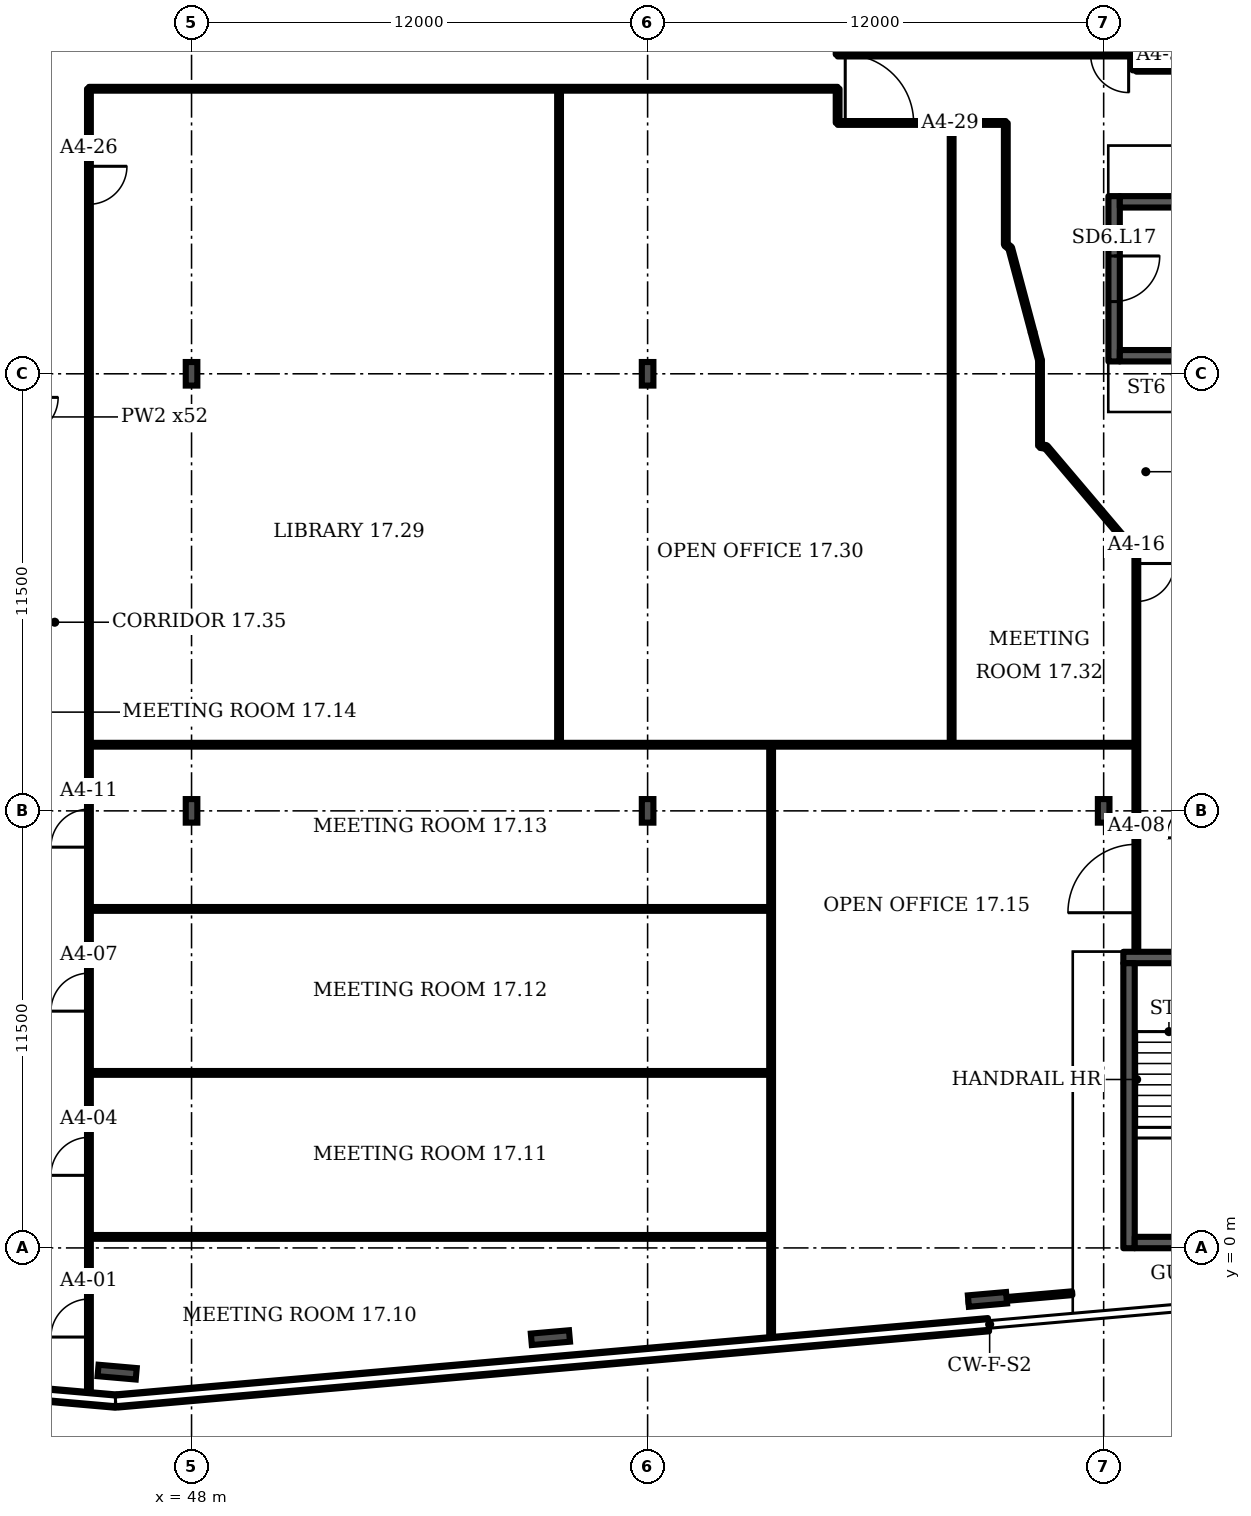
"""IFC4 building model, lengths in metres.
Left out: names, types, materials, properties, quantities, classifications, styles, units other than length and angle.
Written with IfcOpenShell. Run it as: python <this file> out.ifc"""

import sys

from ifc_helpers import new_model, si_unit, direction, frame, frame_2d, origin, origin_2d, place, context, subcontext, project, spatial, rectangle, i_section, extrude, element, fill, save


model = new_model("IFC4")
c1 = context("Model", 3, precision=1e-05, world=origin(), true_north=direction((0.0, 1.0)))
c2 = subcontext(c1, "Body", "Model", "MODEL_VIEW")
j1 = project(units=[si_unit("LENGTHUNIT", "METRE"), si_unit("PLANEANGLEUNIT", "RADIAN")], contexts=[c1])
p1 = place(None, origin())
s1 = spatial("IfcSite", under=j1, at=p1, CompositionType="ELEMENT")
p2 = place(p1, origin())
s2 = spatial("IfcBuilding", under=s1, at=p2, CompositionType="ELEMENT")
p3 = place(p2, frame((0.0, 0.0, 81.1)))
s3 = spatial("IfcBuildingStorey", under=s2, at=p3, CompositionType="ELEMENT", Elevation=81.1)
for number, where, z_axis, x_axis in (
    (1, (46.042, -3.268, 0.0), (0.0, 0.0, 1.0), (-0.087, -0.996, 0.0)),
    (2, (57.442, -2.361, 0.0), (0.0, 0.0, 1.0), (0.087, -0.996, 0.0)),
    (3, (68.942, -1.355, 0.0), (0.0, 0.0, 1.0), (0.087, -0.996, 0.0)),
):
    element("IfcColumn", number, at=place(p3, frame(where, z_axis=z_axis, x_axis=x_axis)), inside=s3, PredefinedType="COLUMN", context=c2, shape_type="SweptSolid", body=[
        extrude(i_section(OverallWidth=0.302, OverallDepth=1.008, WebThickness=0.021, FlangeThickness=0.04, FilletRadius=0.03, at=origin_2d()), origin(), (0.0, 0.0, 1.0), 3.6),
    ])
for number, where, z_axis, x_axis in (
    (4, (48.0, 11.5, 0.0), (0.0, 0.0, 1.0), (1.0, 0.0, 0.0)),
    (5, (60.0, 11.5, 0.0), (0.0, 0.0, 1.0), (1.0, 0.0, 0.0)),
    (6, (72.0, 11.5, 0.0), (0.0, 0.0, 1.0), (1.0, 0.0, 0.0)),
    (7, (48.0, 23.0, 0.0), (0.0, 0.0, 1.0), (1.0, 0.0, 0.0)),
    (8, (60.0, 23.0, 0.0), (0.0, 0.0, 1.0), (1.0, 0.0, 0.0)),
):
    element("IfcColumn", number, at=place(p3, frame(where, z_axis=z_axis, x_axis=x_axis)), inside=s3, PredefinedType="COLUMN", context=c2, shape_type="SweptSolid", body=[
        extrude(i_section(OverallWidth=0.305, OverallDepth=0.62, WebThickness=0.021, FlangeThickness=0.04, FilletRadius=0.027, at=origin_2d()), origin(), (0.0, 0.0, 1.0), 3.6),
    ])
p4 = place(p3, frame((34.601, -3.032, 0.0), z_axis=(0.0, 0.0, 1.0), x_axis=(0.996193, -0.087148, 0.0)))
e9 = element("IfcWall", 9, at=p4, inside=s3, PredefinedType="SOLIDWALL", context=c2, shape_type="SweptSolid", body=[
    extrude(rectangle(XDim=11.458, YDim=0.35, at=frame_2d((5.729, 0.0))), origin(), (0.0, 0.0, 1.0), 1.0),
])
p5 = place(p3, frame((46.045, -4.026, 0.0), z_axis=(0.0, 0.0, 1.0), x_axis=(0.99619, 0.087163, 0.0)))
e10 = element("IfcWall", 10, at=p5, inside=s3, PredefinedType="SOLIDWALL", context=c2, shape_type="SweptSolid", body=[
    extrude(rectangle(XDim=23.013, YDim=0.35, at=frame_2d((11.506, 0.0))), origin(), (0.0, 0.0, 1.0), 1.0),
])
p6 = place(p3, frame((72.518, 7.642, 0.0), z_axis=(0.0, 0.0, 1.0), x_axis=(1.0, 0.0, 0.0)))
e11 = element("IfcWall", 11, at=p6, inside=s3, PredefinedType="SHEAR", context=c2, shape_type="SweptSolid", body=[
    extrude(rectangle(XDim=4.35, YDim=0.3, at=frame_2d((2.175, 0.0))), origin(), (0.0, 0.0, 1.0), 3.2),
])
p7 = place(p6, frame((1.575, 0.0, 0.0)))
e12 = element("IfcOpeningElement", 12, at=p7, cuts=e11, PredefinedType="OPENING", context=c2, shape_type="SweptSolid", body=[
    extrude(rectangle(XDim=1.2, YDim=2.1, at=frame_2d((0.6, 1.05))), frame((0.0, 0.16, 0.0), z_axis=(0.0, -1.0, 0.0), x_axis=(1.0, 0.0, 0.0)), (0.0, 0.0, 1.0), 0.32),
])
p8 = place(p3, frame((72.275, 23.325, 0.0), z_axis=(0.0, 0.0, 1.0), x_axis=(0.0, 1.0, 0.0)))
e13 = element("IfcWall", 13, at=p8, inside=s3, PredefinedType="SHEAR", context=c2, shape_type="SweptSolid", body=[
    extrude(rectangle(XDim=4.35, YDim=0.3, at=frame_2d((2.175, 0.0))), origin(), (0.0, 0.0, 1.0), 3.2),
])
p9 = place(p8, frame((1.575, 0.0, 0.0)))
e14 = element("IfcOpeningElement", 14, at=p9, cuts=e13, PredefinedType="OPENING", context=c2, shape_type="SweptSolid", body=[
    extrude(rectangle(XDim=1.2, YDim=2.1, at=frame_2d((0.6, 1.05))), frame((0.0, 0.16, 0.0), z_axis=(0.0, -1.0, 0.0), x_axis=(1.0, 0.0, 0.0)), (0.0, 0.0, 1.0), 0.32),
])
p10 = place(p3, frame((45.3, -3.943, 0.0), z_axis=(0.0, 0.0, 1.0), x_axis=(0.0, 1.0, 0.0)))
e15 = element("IfcWall", 15, at=p10, inside=s3, PredefinedType="PARTITIONING", context=c2, shape_type="SweptSolid", body=[
    extrude(rectangle(XDim=34.443, YDim=0.1, at=frame_2d((17.222, 0.0))), origin(), (0.0, 0.0, 1.0), 2.58),
])
p11 = place(p10, frame((1.598, 0.0, 0.0)))
e16 = element("IfcOpeningElement", 16, at=p11, cuts=e15, PredefinedType="OPENING", context=c2, shape_type="SweptSolid", body=[
    extrude(rectangle(XDim=1.0, YDim=2.1, at=frame_2d((0.5, 1.05))), frame((0.0, 0.06, 0.0), z_axis=(0.0, -1.0, 0.0), x_axis=(1.0, 0.0, 0.0)), (0.0, 0.0, 1.0), 0.12),
])
p12 = place(p10, frame((5.853, 0.0, 0.0)))
e17 = element("IfcOpeningElement", 17, at=p12, cuts=e15, PredefinedType="OPENING", context=c2, shape_type="SweptSolid", body=[
    extrude(rectangle(XDim=1.0, YDim=2.1, at=frame_2d((0.5, 1.05))), frame((0.0, 0.06, 0.0), z_axis=(0.0, -1.0, 0.0), x_axis=(1.0, 0.0, 0.0)), (0.0, 0.0, 1.0), 0.12),
])
p13 = place(p10, frame((10.173, 0.0, 0.0)))
e18 = element("IfcOpeningElement", 18, at=p13, cuts=e15, PredefinedType="OPENING", context=c2, shape_type="SweptSolid", body=[
    extrude(rectangle(XDim=1.0, YDim=2.1, at=frame_2d((0.5, 1.05))), frame((0.0, 0.06, 0.0), z_axis=(0.0, -1.0, 0.0), x_axis=(1.0, 0.0, 0.0)), (0.0, 0.0, 1.0), 0.12),
])
p14 = place(p10, frame((14.488, 0.0, 0.0)))
e19 = element("IfcOpeningElement", 19, at=p14, cuts=e15, PredefinedType="OPENING", context=c2, shape_type="SweptSolid", body=[
    extrude(rectangle(XDim=1.0, YDim=2.1, at=frame_2d((0.5, 1.05))), frame((0.0, 0.06, 0.0), z_axis=(0.0, -1.0, 0.0), x_axis=(1.0, 0.0, 0.0)), (0.0, 0.0, 1.0), 0.12),
])
p15 = place(p10, frame((31.403, 0.0, 0.0)))
e20 = element("IfcOpeningElement", 20, at=p15, cuts=e15, PredefinedType="OPENING", context=c2, shape_type="SweptSolid", body=[
    extrude(rectangle(XDim=1.0, YDim=2.1, at=frame_2d((0.5, 1.05))), frame((0.0, 0.06, 0.0), z_axis=(0.0, -1.0, 0.0), x_axis=(1.0, 0.0, 0.0)), (0.0, 0.0, 1.0), 0.12),
])
for number, where, z_axis, x_axis in (
    (21, (45.3, 0.29, 0.0), (0.0, 0.0, 1.0), (1.0, 0.0, 0.0)),
    (22, (45.3, 4.605, 0.0), (0.0, 0.0, 1.0), (1.0, 0.0, 0.0)),
    (23, (45.3, 8.92, 0.0), (0.0, 0.0, 1.0), (1.0, 0.0, 0.0)),
):
    element("IfcWall", number, at=place(p3, frame(where, z_axis=z_axis, x_axis=x_axis)), inside=s3, PredefinedType="PARTITIONING", context=c2, shape_type="SweptSolid", body=[
        extrude(rectangle(XDim=17.95, YDim=0.1, at=frame_2d((8.975, 0.0))), origin(), (0.0, 0.0, 1.0), 3.2),
    ])
p16 = place(p3, frame((45.3, 13.24, 0.0), z_axis=(0.0, 0.0, 1.0), x_axis=(1.0, 0.0, 0.0)))
e24 = element("IfcWall", 24, at=p16, inside=s3, PredefinedType="PARTITIONING", context=c2, shape_type="SweptSolid", body=[
    extrude(rectangle(XDim=27.56, YDim=0.1, at=frame_2d((13.78, 0.0))), origin(), (0.0, 0.0, 1.0), 3.2),
])
p17 = place(p3, frame((45.3, 30.5, 0.0), z_axis=(0.0, 0.0, 1.0), x_axis=(1.0, 0.0, 0.0)))
e25 = element("IfcWall", 25, at=p17, inside=s3, PredefinedType="PARTITIONING", context=c2, shape_type="SweptSolid", body=[
    extrude(rectangle(XDim=19.7, YDim=0.1, at=frame_2d((9.85, 0.0))), origin(), (0.0, 0.0, 1.0), 3.2),
])
p18 = place(p3, frame((57.67, 13.24, 0.0), z_axis=(0.0, 0.0, 1.0), x_axis=(0.0, 1.0, 0.0)))
e26 = element("IfcWall", 26, at=p18, inside=s3, PredefinedType="PARTITIONING", context=c2, shape_type="SweptSolid", body=[
    extrude(rectangle(XDim=17.26, YDim=0.1, at=frame_2d((8.63, 0.0))), origin(), (0.0, 0.0, 1.0), 3.2),
])
p19 = place(p3, frame((63.25, -2.495, 0.0), z_axis=(0.0, 0.0, 1.0), x_axis=(0.0, 1.0, 0.0)))
e27 = element("IfcWall", 27, at=p19, inside=s3, PredefinedType="PARTITIONING", context=c2, shape_type="SweptSolid", body=[
    extrude(rectangle(XDim=15.735, YDim=0.1, at=frame_2d((7.868, 0.0))), origin(), (0.0, 0.0, 1.0), 2.58),
])
p20 = place(p3, frame((65.0, 29.6, 0.0), z_axis=(0.0, 0.0, 1.0), x_axis=(0.0, 1.0, 0.0)))
e28 = element("IfcWall", 28, at=p20, inside=s3, PredefinedType="PARTITIONING", context=c2, shape_type="SweptSolid", body=[
    extrude(rectangle(XDim=0.9, YDim=0.1, at=frame_2d((0.45, 0.0))), origin(), (0.0, 0.0, 1.0), 3.2),
])
p21 = place(p3, frame((65.0, 29.6, 0.0), z_axis=(0.0, 0.0, 1.0), x_axis=(1.0, 0.0, 0.0)))
e29 = element("IfcWall", 29, at=p21, inside=s3, PredefinedType="PARTITIONING", context=c2, shape_type="SweptSolid", body=[
    extrude(rectangle(XDim=4.425, YDim=0.1, at=frame_2d((2.212, 0.0))), origin(), (0.0, 0.0, 1.0), 3.2),
])
p22 = place(p21, frame((0.2, 0.0, 0.0)))
e30 = element("IfcOpeningElement", 30, at=p22, cuts=e29, PredefinedType="OPENING", context=c2, shape_type="SweptSolid", body=[
    extrude(rectangle(XDim=1.8, YDim=2.1, at=frame_2d((0.9, 1.05))), frame((0.0, 0.06, 0.0), z_axis=(0.0, -1.0, 0.0), x_axis=(1.0, 0.0, 0.0)), (0.0, 0.0, 1.0), 0.12),
])
p23 = place(p3, frame((65.0, 31.4, 0.0), z_axis=(0.0, 0.0, 1.0), x_axis=(0.0, 1.0, 0.0)))
e31 = element("IfcWall", 31, at=p23, inside=s3, PredefinedType="PARTITIONING", context=c2, shape_type="SweptSolid", body=[
    extrude(rectangle(XDim=2.58, YDim=0.1, at=frame_2d((1.29, 0.0))), origin(), (0.0, 0.0, 1.0), 3.2),
])
p24 = place(p23, frame((0.9, 0.0, 0.0)))
e32 = element("IfcOpeningElement", 32, at=p24, cuts=e31, PredefinedType="OPENING", context=c2, shape_type="SweptSolid", body=[
    extrude(rectangle(XDim=1.0, YDim=2.1, at=frame_2d((0.5, 1.05))), frame((0.0, 0.06, 0.0), z_axis=(0.0, -1.0, 0.0), x_axis=(1.0, 0.0, 0.0)), (0.0, 0.0, 1.0), 0.12),
])
p25 = place(p3, frame((65.0, 31.4, 0.0), z_axis=(0.0, 0.0, 1.0), x_axis=(1.0, 0.0, 0.0)))
e33 = element("IfcWall", 33, at=p25, inside=s3, PredefinedType="PARTITIONING", context=c2, shape_type="SweptSolid", body=[
    extrude(rectangle(XDim=7.81, YDim=0.1, at=frame_2d((3.905, 0.0))), origin(), (0.0, 0.0, 1.0), 3.2),
])
p26 = place(p25, frame((6.657, 0.0, 0.0)))
e34 = element("IfcOpeningElement", 34, at=p26, cuts=e33, PredefinedType="OPENING", context=c2, shape_type="SweptSolid", body=[
    extrude(rectangle(XDim=1.0, YDim=2.1, at=frame_2d((0.5, 1.05))), frame((0.0, 0.06, 0.0), z_axis=(0.0, -1.0, 0.0), x_axis=(1.0, 0.0, 0.0)), (0.0, 0.0, 1.0), 0.12),
])
p27 = place(p3, frame((68.0, 13.24, 0.0), z_axis=(0.0, 0.0, 1.0), x_axis=(0.0, 1.0, 0.0)))
e35 = element("IfcWall", 35, at=p27, inside=s3, PredefinedType="PARTITIONING", context=c2, shape_type="SweptSolid", body=[
    extrude(rectangle(XDim=16.36, YDim=0.1, at=frame_2d((8.18, 0.0))), origin(), (0.0, 0.0, 1.0), 3.2),
])
p28 = place(p3, frame((68.0, 31.4, 0.0), z_axis=(0.0, 0.0, 1.0), x_axis=(0.0, 1.0, 0.0)))
e36 = element("IfcWall", 36, at=p28, inside=s3, PredefinedType="PARTITIONING", context=c2, shape_type="SweptSolid", body=[
    extrude(rectangle(XDim=8.39, YDim=0.1, at=frame_2d((4.195, 0.0))), origin(), (0.0, 0.0, 1.0), 3.2),
])
p29 = place(p3, frame((68.445, -1.43, 0.0), z_axis=(0.0, 0.0, 1.0), x_axis=(0.996195, 0.087118, 0.0)))
e37 = element("IfcWall", 37, at=p29, inside=s3, PredefinedType="PARTITIONING", context=c2, shape_type="SweptSolid", body=[
    extrude(rectangle(XDim=2.738, YDim=0.1, at=frame_2d((1.369, 0.0))), origin(), (0.0, 0.0, 1.0), 2.58),
])
p30 = place(p3, frame((69.425, 26.4, 0.0), z_axis=(0.0, 0.0, 1.0), x_axis=(0.0, 1.0, 0.0)))
e38 = element("IfcWall", 38, at=p30, inside=s3, PredefinedType="PARTITIONING", context=c2, shape_type="SweptSolid", body=[
    extrude(rectangle(XDim=3.2, YDim=0.1, at=frame_2d((1.6, 0.0))), origin(), (0.0, 0.0, 1.0), 3.2),
])
p31 = place(p3, frame((69.54, 26.31, 0.0), z_axis=(0.0, 0.0, 1.0), x_axis=(-0.787997, 0.615675, 0.0)))
e39 = element("IfcWall", 39, at=p31, inside=s3, PredefinedType="PARTITIONING", context=c2, shape_type="SweptSolid", body=[
    extrude(rectangle(XDim=0.146, YDim=0.1, at=frame_2d((0.073, 0.0))), origin(), (0.0, 0.0, 1.0), 3.2),
])
p32 = place(p3, frame((70.13, 24.095, 0.0), z_axis=(0.0, 0.0, 1.0), x_axis=(-0.257318, 0.966327, 0.0)))
e40 = element("IfcWall", 40, at=p32, inside=s3, PredefinedType="PARTITIONING", context=c2, shape_type="SweptSolid", body=[
    extrude(rectangle(XDim=2.292, YDim=0.1, at=frame_2d((1.146, 0.0))), origin(), (0.0, 0.0, 1.0), 3.2),
])
p33 = place(p3, frame((70.325, 21.1, 0.0), z_axis=(0.0, 0.0, 1.0), x_axis=(0.0, 1.0, 0.0)))
e41 = element("IfcWall", 41, at=p33, inside=s3, PredefinedType="PARTITIONING", context=c2, shape_type="SweptSolid", body=[
    extrude(rectangle(XDim=2.255, YDim=0.1, at=frame_2d((1.127, 0.0))), origin(), (0.0, 0.0, 1.0), 3.2),
])
p34 = place(p3, frame((70.325, 23.355, 0.0), z_axis=(0.0, 0.0, 1.0), x_axis=(-0.254901, 0.966965, 0.0)))
e42 = element("IfcWall", 42, at=p34, inside=s3, PredefinedType="PARTITIONING", context=c2, shape_type="SweptSolid", body=[
    extrude(rectangle(XDim=0.765, YDim=0.1, at=frame_2d((0.383, 0.0))), origin(), (0.0, 0.0, 1.0), 3.2),
])
p35 = place(p3, frame((70.485, 21.075, 0.0), z_axis=(0.0, 0.0, 1.0), x_axis=(-0.987098, 0.160112, 0.0)))
e43 = element("IfcWall", 43, at=p35, inside=s3, PredefinedType="PARTITIONING", context=c2, shape_type="SweptSolid", body=[
    extrude(rectangle(XDim=0.157, YDim=0.1, at=frame_2d((0.079, 0.0))), origin(), (0.0, 0.0, 1.0), 3.2),
])
p36 = place(p3, frame((72.81, 30.985, 0.0), z_axis=(0.0, 0.0, 1.0), x_axis=(0.0, 1.0, 0.0)))
e44 = element("IfcWall", 44, at=p36, inside=s3, PredefinedType="PARTITIONING", context=c2, shape_type="SweptSolid", body=[
    extrude(rectangle(XDim=0.415, YDim=0.1, at=frame_2d((0.208, 0.0))), origin(), (0.0, 0.0, 1.0), 3.2),
])
p37 = place(p3, frame((72.86, 7.812, 0.0), z_axis=(0.0, 0.0, 1.0), x_axis=(0.0, 1.0, 0.0)))
e45 = element("IfcWall", 45, at=p37, inside=s3, PredefinedType="PARTITIONING", context=c2, shape_type="SweptSolid", body=[
    extrude(rectangle(XDim=10.463, YDim=0.1, at=frame_2d((5.231, 0.0))), origin(), (0.0, 0.0, 1.0), 3.2),
])
p38 = place(p37, frame((1.008, 0.0, 0.0)))
e46 = element("IfcOpeningElement", 46, at=p38, cuts=e45, PredefinedType="OPENING", context=c2, shape_type="SweptSolid", body=[
    extrude(rectangle(XDim=1.8, YDim=2.1, at=frame_2d((0.9, 1.05))), frame((0.0, 0.06, 0.0), z_axis=(0.0, -1.0, 0.0), x_axis=(1.0, 0.0, 0.0)), (0.0, 0.0, 1.0), 0.12),
])
p39 = place(p37, frame((9.197, 0.0, 0.0)))
e47 = element("IfcOpeningElement", 47, at=p39, cuts=e45, PredefinedType="OPENING", context=c2, shape_type="SweptSolid", body=[
    extrude(rectangle(XDim=1.0, YDim=2.1, at=frame_2d((0.5, 1.05))), frame((0.0, 0.06, 0.0), z_axis=(0.0, -1.0, 0.0), x_axis=(1.0, 0.0, 0.0)), (0.0, 0.0, 1.0), 0.12),
])
p40 = place(p3, frame((72.86, 31.0, 0.0), z_axis=(0.0, 0.0, 1.0), x_axis=(1.0, 0.0, 0.0)))
e48 = element("IfcWall", 48, at=p40, inside=s3, PredefinedType="PARTITIONING", context=c2, shape_type="SweptSolid", body=[
    extrude(rectangle(XDim=1.8, YDim=0.1, at=frame_2d((0.9, 0.0))), origin(), (0.0, 0.0, 1.0), 3.2),
])
p41 = place(p3, frame((72.86, 18.275, 0.0), z_axis=(0.0, 0.0, 1.0), x_axis=(-0.646848, 0.762613, 0.0)))
e49 = element("IfcWall", 49, at=p41, inside=s3, PredefinedType="PARTITIONING", context=c2, shape_type="SweptSolid", body=[
    extrude(rectangle(XDim=3.672, YDim=0.1, at=frame_2d((1.836, 0.0))), origin(), (0.0, 0.0, 1.0), 3.2),
])
p42 = place(p3, frame((72.667, -0.008, 0.0), z_axis=(0.0, 0.0, 1.0), x_axis=(0.0, 1.0, 0.0)))
e50 = element("IfcWall", 50, at=p42, inside=s3, PredefinedType="SHEAR", context=c2, shape_type="SweptSolid", body=[
    extrude(rectangle(XDim=7.5, YDim=0.3, at=frame_2d((3.75, 0.0))), origin(), (0.0, 0.0, 1.0), 3.2),
])
p43 = place(p3, frame((72.817, 0.142, 0.0), z_axis=(0.0, 0.0, 1.0), x_axis=(1.0, 0.0, 0.0)))
e51 = element("IfcWall", 51, at=p43, inside=s3, PredefinedType="SHEAR", context=c2, shape_type="SweptSolid", body=[
    extrude(rectangle(XDim=3.75, YDim=0.3, at=frame_2d((1.875, 0.0))), origin(), (0.0, 0.0, 1.0), 3.2),
])
for number, where, z_axis, x_axis in (
    (52, (72.425, 23.475, 0.0), (0.0, 0.0, 1.0), (1.0, 0.0, 0.0)),
    (53, (72.425, 27.525, 0.0), (0.0, 0.0, 1.0), (1.0, 0.0, 0.0)),
):
    element("IfcWall", number, at=place(p3, frame(where, z_axis=z_axis, x_axis=x_axis)), inside=s3, PredefinedType="SHEAR", context=c2, shape_type="SweptSolid", body=[
        extrude(rectangle(XDim=7.5, YDim=0.3, at=frame_2d((3.75, 0.0))), origin(), (0.0, 0.0, 1.0), 3.2),
    ])
p44 = place(p9, origin())
e54 = element("IfcDoor", 54, at=p44, inside=s3, OperationType="SINGLE_SWING_RIGHT", PredefinedType="DOOR", context=c2, shape_type="SweptSolid", body=[
    extrude(rectangle(XDim=1.2, YDim=2.1, at=frame_2d((0.6, 1.05))), frame((0.0, 0.025, 0.0), z_axis=(0.0, -1.0, 0.0), x_axis=(1.0, 0.0, 0.0)), (0.0, 0.0, 1.0), 0.05),
])
fill(e14, e54)
p45 = place(p11, origin())
e55 = element("IfcDoor", 55, at=p45, inside=s3, OperationType="SINGLE_SWING_LEFT", PredefinedType="DOOR", context=c2, shape_type="SweptSolid", body=[
    extrude(rectangle(XDim=1.0, YDim=2.1, at=frame_2d((0.5, 1.05))), frame((0.0, 0.025, 0.0), z_axis=(0.0, -1.0, 0.0), x_axis=(1.0, 0.0, 0.0)), (0.0, 0.0, 1.0), 0.05),
])
fill(e16, e55)
p46 = place(p12, origin())
e56 = element("IfcDoor", 56, at=p46, inside=s3, OperationType="SINGLE_SWING_LEFT", PredefinedType="DOOR", context=c2, shape_type="SweptSolid", body=[
    extrude(rectangle(XDim=1.0, YDim=2.1, at=frame_2d((0.5, 1.05))), frame((0.0, 0.025, 0.0), z_axis=(0.0, -1.0, 0.0), x_axis=(1.0, 0.0, 0.0)), (0.0, 0.0, 1.0), 0.05),
])
fill(e17, e56)
p47 = place(p13, origin())
e57 = element("IfcDoor", 57, at=p47, inside=s3, OperationType="SINGLE_SWING_LEFT", PredefinedType="DOOR", context=c2, shape_type="SweptSolid", body=[
    extrude(rectangle(XDim=1.0, YDim=2.1, at=frame_2d((0.5, 1.05))), frame((0.0, 0.025, 0.0), z_axis=(0.0, -1.0, 0.0), x_axis=(1.0, 0.0, 0.0)), (0.0, 0.0, 1.0), 0.05),
])
fill(e18, e57)
p48 = place(p38, origin())
e58 = element("IfcDoor", 58, at=p48, inside=s3, OperationType="DOUBLE_DOOR_SINGLE_SWING", PredefinedType="DOOR", context=c2, shape_type="SweptSolid", body=[
    extrude(rectangle(XDim=1.8, YDim=2.1, at=frame_2d((0.9, 1.05))), frame((0.0, 0.025, 0.0), z_axis=(0.0, -1.0, 0.0), x_axis=(1.0, 0.0, 0.0)), (0.0, 0.0, 1.0), 0.05),
])
fill(e46, e58)
p49 = place(p14, origin())
e59 = element("IfcDoor", 59, at=p49, inside=s3, OperationType="SINGLE_SWING_LEFT", PredefinedType="DOOR", context=c2, shape_type="SweptSolid", body=[
    extrude(rectangle(XDim=1.0, YDim=2.1, at=frame_2d((0.5, 1.05))), frame((0.0, 0.025, 0.0), z_axis=(0.0, -1.0, 0.0), x_axis=(1.0, 0.0, 0.0)), (0.0, 0.0, 1.0), 0.05),
])
fill(e19, e59)
p50 = place(p39, origin())
e60 = element("IfcDoor", 60, at=p50, inside=s3, OperationType="SINGLE_SWING_RIGHT", PredefinedType="DOOR", context=c2, shape_type="SweptSolid", body=[
    extrude(rectangle(XDim=1.0, YDim=2.1, at=frame_2d((0.5, 1.05))), frame((0.0, 0.025, 0.0), z_axis=(0.0, -1.0, 0.0), x_axis=(1.0, 0.0, 0.0)), (0.0, 0.0, 1.0), 0.05),
])
fill(e47, e60)
p51 = place(p15, origin())
e61 = element("IfcDoor", 61, at=p51, inside=s3, OperationType="SINGLE_SWING_RIGHT", PredefinedType="DOOR", context=c2, shape_type="SweptSolid", body=[
    extrude(rectangle(XDim=1.0, YDim=2.1, at=frame_2d((0.5, 1.05))), frame((0.0, 0.025, 0.0), z_axis=(0.0, -1.0, 0.0), x_axis=(1.0, 0.0, 0.0)), (0.0, 0.0, 1.0), 0.05),
])
fill(e20, e61)
p52 = place(p22, origin())
e62 = element("IfcDoor", 62, at=p52, inside=s3, OperationType="DOUBLE_DOOR_SINGLE_SWING", PredefinedType="DOOR", context=c2, shape_type="SweptSolid", body=[
    extrude(rectangle(XDim=1.8, YDim=2.1, at=frame_2d((0.9, 1.05))), frame((0.0, 0.025, 0.0), z_axis=(0.0, -1.0, 0.0), x_axis=(1.0, 0.0, 0.0)), (0.0, 0.0, 1.0), 0.05),
])
fill(e30, e62)
p53 = place(p26, origin())
e63 = element("IfcDoor", 63, at=p53, inside=s3, OperationType="SINGLE_SWING_RIGHT", PredefinedType="DOOR", context=c2, shape_type="SweptSolid", body=[
    extrude(rectangle(XDim=1.0, YDim=2.1, at=frame_2d((0.5, 1.05))), frame((0.0, 0.025, 0.0), z_axis=(0.0, -1.0, 0.0), x_axis=(1.0, 0.0, 0.0)), (0.0, 0.0, 1.0), 0.05),
])
fill(e34, e63)
save(model, sys.argv[1])
